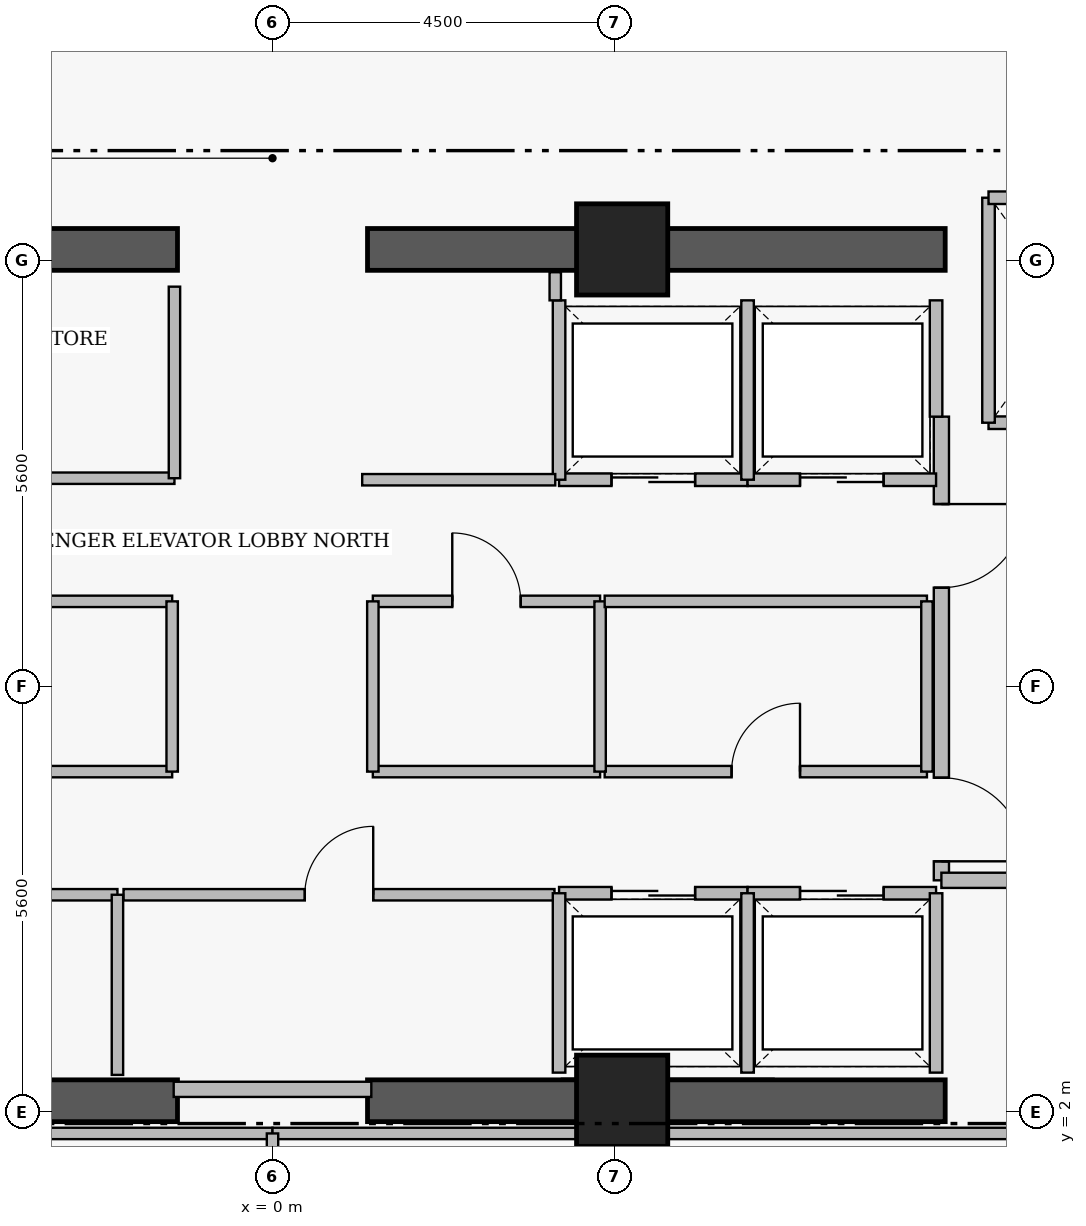
"""IFC4 building model, lengths in metres.
Left out: names, types, materials, properties, quantities, classifications, styles, units other than length and angle.
Written with IfcOpenShell. Run it as: python <this file> out.ifc"""

import sys

from ifc_helpers import new_model, si_unit, direction, frame, frame_2d, origin, origin_2d, place, context, subcontext, project, spatial, rectangle, extrude, element, fill, save


model = new_model("IFC4")
c1 = context("Model", 3, precision=1e-05, world=origin(), true_north=direction((0.0, 1.0)))
c2 = subcontext(c1, "Body", "Model", "MODEL_VIEW")
j1 = project(units=[si_unit("LENGTHUNIT", "METRE"), si_unit("PLANEANGLEUNIT", "RADIAN")], contexts=[c1])
p1 = place(None, origin())
s1 = spatial("IfcSite", under=j1, at=p1, CompositionType="ELEMENT")
p2 = place(p1, origin())
s2 = spatial("IfcBuilding", under=s1, at=p2, CompositionType="ELEMENT")
p3 = place(p2, frame((0.0, 0.0, 292.85)))
s3 = spatial("IfcBuildingStorey", under=s2, at=p3, CompositionType="ELEMENT", Elevation=292.85)
for number, where, z_axis, x_axis in (
    (1, (-8.85, 2.15, 0.0), (0.0, 0.0, 1.0), (1.0, 0.0, 0.0)),
    (2, (1.25, 2.15, 0.0), (0.0, 0.0, 1.0), (1.0, 0.0, 0.0)),
    (3, (-8.85, 13.35, 0.0), (0.0, 0.0, 1.0), (1.0, 0.0, 0.0)),
    (4, (1.25, 13.35, 0.0), (0.0, 0.0, 1.0), (1.0, 0.0, 0.0)),
):
    element("IfcWall", number, at=place(p3, frame(where, z_axis=z_axis, x_axis=x_axis)), inside=s3, PredefinedType="SHEAR", context=c2, shape_type="SweptSolid", body=[
        extrude(rectangle(XDim=7.6, YDim=0.55, at=frame_2d((3.8, 0.0))), origin(), (0.0, 0.0, 1.0), 4.16),
    ])
for number, where, z_axis, x_axis in (
    (5, (4.6, 13.35, 0.0), (0.0, 0.0, 1.0), (1.0, 0.0, 0.0)),
    (6, (4.6, 2.15, 0.0), (0.0, 0.0, 1.0), (1.0, 0.0, 0.0)),
):
    element("IfcColumn", number, at=place(p3, frame(where, z_axis=z_axis, x_axis=x_axis)), inside=s3, PredefinedType="COLUMN", context=c2, shape_type="SweptSolid", body=[
        extrude(rectangle(XDim=1.2, YDim=1.2, at=origin_2d()), origin(), (0.0, 0.0, 1.0), 4.4),
    ])
p4 = place(p3, frame((8.8, 11.15, 0.0), z_axis=(0.0, 0.0, 1.0), x_axis=(0.0, -1.0, 0.0)))
e7 = element("IfcWall", 7, at=p4, inside=s3, PredefinedType="PARTITIONING", context=c2, shape_type="SweptSolid", body=[
    extrude(rectangle(XDim=6.1, YDim=0.2, at=frame_2d((3.05, 0.0))), origin(), (0.0, 0.0, 1.0), 4.16),
])
p5 = place(p4, frame((1.15, 0.0, 0.0)))
e8 = element("IfcOpeningElement", 8, at=p5, cuts=e7, PredefinedType="OPENING", context=c2, shape_type="SweptSolid", body=[
    extrude(rectangle(XDim=1.1, YDim=2.2, at=frame_2d((0.55, 1.1))), frame((0.0, 0.11, 0.0), z_axis=(0.0, -1.0, 0.0), x_axis=(1.0, 0.0, 0.0)), (0.0, 0.0, 1.0), 0.22),
])
p6 = place(p4, frame((4.75, 0.0, 0.0)))
e9 = element("IfcOpeningElement", 9, at=p6, cuts=e7, PredefinedType="OPENING", context=c2, shape_type="SweptSolid", body=[
    extrude(rectangle(XDim=1.1, YDim=2.2, at=frame_2d((0.55, 1.1))), frame((0.0, 0.11, 0.0), z_axis=(0.0, -1.0, 0.0), x_axis=(1.0, 0.0, 0.0)), (0.0, 0.0, 1.0), 0.22),
])
p7 = place(p3, frame((9.42, 11.07, 0.0), z_axis=(0.0, 0.0, 1.0), x_axis=(1.0, 0.0, 0.0)))
e10 = element("IfcWall", 10, at=p7, inside=s3, PredefinedType="PARTITIONING", context=c2, shape_type="SweptSolid", body=[
    extrude(rectangle(XDim=2.16, YDim=0.165, at=frame_2d((1.08, 0.0))), origin(), (0.0, 0.0, 1.0), 4.16),
])
p8 = place(p7, frame((0.53, 0.0, 0.0)))
e11 = element("IfcOpeningElement", 11, at=p8, cuts=e10, PredefinedType="OPENING", context=c2, shape_type="SweptSolid", body=[
    extrude(rectangle(XDim=1.15, YDim=2.25, at=frame_2d((0.575, 1.125))), frame((0.0, 0.093, 0.0), z_axis=(0.0, -1.0, 0.0), x_axis=(1.0, 0.0, 0.0)), (0.0, 0.0, 1.0), 0.185),
])
p9 = place(p3, frame((3.77, 4.88, 0.0), z_axis=(0.0, 0.0, 1.0), x_axis=(1.0, 0.0, 0.0)))
e12 = element("IfcWall", 12, at=p9, inside=s3, PredefinedType="PARTITIONING", context=c2, shape_type="SweptSolid", body=[
    extrude(rectangle(XDim=2.48, YDim=0.165, at=frame_2d((1.24, 0.0))), origin(), (0.0, 0.0, 1.0), 4.16),
])
p10 = place(p9, frame((0.69, 0.0, 0.0)))
e13 = element("IfcOpeningElement", 13, at=p10, cuts=e12, PredefinedType="OPENING", context=c2, shape_type="SweptSolid", body=[
    extrude(rectangle(XDim=1.1, YDim=2.25, at=frame_2d((0.55, 1.125))), frame((0.0, 0.093, 0.0), z_axis=(0.0, -1.0, 0.0), x_axis=(1.0, 0.0, 0.0)), (0.0, 0.0, 1.0), 0.185),
])
p11 = place(p3, frame((6.25, 4.88, 0.0), z_axis=(0.0, 0.0, 1.0), x_axis=(1.0, 0.0, 0.0)))
e14 = element("IfcWall", 14, at=p11, inside=s3, PredefinedType="PARTITIONING", context=c2, shape_type="SweptSolid", body=[
    extrude(rectangle(XDim=2.48, YDim=0.165, at=frame_2d((1.24, 0.0))), origin(), (0.0, 0.0, 1.0), 4.16),
])
p12 = place(p11, frame((0.69, 0.0, 0.0)))
e15 = element("IfcOpeningElement", 15, at=p12, cuts=e14, PredefinedType="OPENING", context=c2, shape_type="SweptSolid", body=[
    extrude(rectangle(XDim=1.1, YDim=2.25, at=frame_2d((0.55, 1.125))), frame((0.0, 0.093, 0.0), z_axis=(0.0, -1.0, 0.0), x_axis=(1.0, 0.0, 0.0)), (0.0, 0.0, 1.0), 0.185),
])
p13 = place(p3, frame((3.77, 10.32, 0.0), z_axis=(0.0, 0.0, 1.0), x_axis=(1.0, 0.0, 0.0)))
e16 = element("IfcWall", 16, at=p13, inside=s3, PredefinedType="PARTITIONING", context=c2, shape_type="SweptSolid", body=[
    extrude(rectangle(XDim=2.48, YDim=0.165, at=frame_2d((1.24, 0.0))), origin(), (0.0, 0.0, 1.0), 4.16),
])
p14 = place(p13, frame((0.69, 0.0, 0.0)))
e17 = element("IfcOpeningElement", 17, at=p14, cuts=e16, PredefinedType="OPENING", context=c2, shape_type="SweptSolid", body=[
    extrude(rectangle(XDim=1.1, YDim=2.25, at=frame_2d((0.55, 1.125))), frame((0.0, 0.093, 0.0), z_axis=(0.0, -1.0, 0.0), x_axis=(1.0, 0.0, 0.0)), (0.0, 0.0, 1.0), 0.185),
])
p15 = place(p3, frame((6.25, 10.32, 0.0), z_axis=(0.0, 0.0, 1.0), x_axis=(1.0, 0.0, 0.0)))
e18 = element("IfcWall", 18, at=p15, inside=s3, PredefinedType="PARTITIONING", context=c2, shape_type="SweptSolid", body=[
    extrude(rectangle(XDim=2.48, YDim=0.165, at=frame_2d((1.24, 0.0))), origin(), (0.0, 0.0, 1.0), 4.16),
])
p16 = place(p15, frame((0.69, 0.0, 0.0)))
e19 = element("IfcOpeningElement", 19, at=p16, cuts=e18, PredefinedType="OPENING", context=c2, shape_type="SweptSolid", body=[
    extrude(rectangle(XDim=1.1, YDim=2.25, at=frame_2d((0.55, 1.125))), frame((0.0, 0.093, 0.0), z_axis=(0.0, -1.0, 0.0), x_axis=(1.0, 0.0, 0.0)), (0.0, 0.0, 1.0), 0.185),
])
p17 = place(p3, frame((-8.71, 4.86, 0.0), z_axis=(0.0, 0.0, 1.0), x_axis=(1.0, 0.0, 0.0)))
e20 = element("IfcWall", 20, at=p17, inside=s3, PredefinedType="PARTITIONING", context=c2, shape_type="SweptSolid", body=[
    extrude(rectangle(XDim=6.67, YDim=0.15, at=frame_2d((3.335, 0.0))), origin(), (0.0, 0.0, 1.0), 4.16),
])
p18 = place(p17, frame((2.885, 0.0, 0.0)))
e21 = element("IfcOpeningElement", 21, at=p18, cuts=e20, PredefinedType="OPENING", context=c2, shape_type="SweptSolid", body=[
    extrude(rectangle(XDim=0.9, YDim=2.15, at=frame_2d((0.45, 1.075))), frame((0.0, 0.085, 0.0), z_axis=(0.0, -1.0, 0.0), x_axis=(1.0, 0.0, 0.0)), (0.0, 0.0, 1.0), 0.17),
])
p19 = place(p3, frame((-1.96, 4.86, 0.0), z_axis=(0.0, 0.0, 1.0), x_axis=(1.0, 0.0, 0.0)))
e22 = element("IfcWall", 22, at=p19, inside=s3, PredefinedType="PARTITIONING", context=c2, shape_type="SweptSolid", body=[
    extrude(rectangle(XDim=5.67, YDim=0.15, at=frame_2d((2.835, 0.0))), origin(), (0.0, 0.0, 1.0), 4.16),
])
p20 = place(p19, frame((2.385, 0.0, 0.0)))
e23 = element("IfcOpeningElement", 23, at=p20, cuts=e22, PredefinedType="OPENING", context=c2, shape_type="SweptSolid", body=[
    extrude(rectangle(XDim=0.9, YDim=2.15, at=frame_2d((0.45, 1.075))), frame((0.0, 0.085, 0.0), z_axis=(0.0, -1.0, 0.0), x_axis=(1.0, 0.0, 0.0)), (0.0, 0.0, 1.0), 0.17),
])
p21 = place(p3, frame((-8.71, 10.34, 0.0), z_axis=(0.0, 0.0, 1.0), x_axis=(1.0, 0.0, 0.0)))
e24 = element("IfcWall", 24, at=p21, inside=s3, PredefinedType="PARTITIONING", context=c2, shape_type="SweptSolid", body=[
    extrude(rectangle(XDim=7.42, YDim=0.15, at=frame_2d((3.71, 0.0))), origin(), (0.0, 0.0, 1.0), 4.16),
])
p22 = place(p21, frame((3.26, 0.0, 0.0)))
e25 = element("IfcOpeningElement", 25, at=p22, cuts=e24, PredefinedType="OPENING", context=c2, shape_type="SweptSolid", body=[
    extrude(rectangle(XDim=0.9, YDim=2.15, at=frame_2d((0.45, 1.075))), frame((0.0, 0.085, 0.0), z_axis=(0.0, -1.0, 0.0), x_axis=(1.0, 0.0, 0.0)), (0.0, 0.0, 1.0), 0.17),
])
p23 = place(p3, frame((-8.61, 6.48, 0.0), z_axis=(0.0, 0.0, 1.0), x_axis=(1.0, 0.0, 0.0)))
e26 = element("IfcWall", 26, at=p23, inside=s3, PredefinedType="PARTITIONING", context=c2, shape_type="SweptSolid", body=[
    extrude(rectangle(XDim=7.29, YDim=0.15, at=frame_2d((3.645, 0.0))), origin(), (0.0, 0.0, 1.0), 4.16),
])
p24 = place(p23, frame((3.195, 0.0, 0.0)))
e27 = element("IfcOpeningElement", 27, at=p24, cuts=e26, PredefinedType="OPENING", context=c2, shape_type="SweptSolid", body=[
    extrude(rectangle(XDim=0.9, YDim=2.15, at=frame_2d((0.45, 1.075))), frame((0.0, 0.085, 0.0), z_axis=(0.0, -1.0, 0.0), x_axis=(1.0, 0.0, 0.0)), (0.0, 0.0, 1.0), 0.17),
])
p25 = place(p3, frame((1.32, 8.72, 0.0), z_axis=(0.0, 0.0, 1.0), x_axis=(1.0, 0.0, 0.0)))
e28 = element("IfcWall", 28, at=p25, inside=s3, PredefinedType="PARTITIONING", context=c2, shape_type="SweptSolid", body=[
    extrude(rectangle(XDim=2.99, YDim=0.15, at=frame_2d((1.495, 0.0))), origin(), (0.0, 0.0, 1.0), 4.16),
])
p26 = place(p25, frame((1.045, 0.0, 0.0)))
e29 = element("IfcOpeningElement", 29, at=p26, cuts=e28, PredefinedType="OPENING", context=c2, shape_type="SweptSolid", body=[
    extrude(rectangle(XDim=0.9, YDim=2.15, at=frame_2d((0.45, 1.075))), frame((0.0, 0.085, 0.0), z_axis=(0.0, -1.0, 0.0), x_axis=(1.0, 0.0, 0.0)), (0.0, 0.0, 1.0), 0.17),
])
p27 = place(p3, frame((4.37, 6.48, 0.0), z_axis=(0.0, 0.0, 1.0), x_axis=(1.0, 0.0, 0.0)))
e30 = element("IfcWall", 30, at=p27, inside=s3, PredefinedType="PARTITIONING", context=c2, shape_type="SweptSolid", body=[
    extrude(rectangle(XDim=4.24, YDim=0.15, at=frame_2d((2.12, 0.0))), origin(), (0.0, 0.0, 1.0), 4.16),
])
p28 = place(p27, frame((1.67, 0.0, 0.0)))
e31 = element("IfcOpeningElement", 31, at=p28, cuts=e30, PredefinedType="OPENING", context=c2, shape_type="SweptSolid", body=[
    extrude(rectangle(XDim=0.9, YDim=2.15, at=frame_2d((0.45, 1.075))), frame((0.0, 0.085, 0.0), z_axis=(0.0, -1.0, 0.0), x_axis=(1.0, 0.0, 0.0)), (0.0, 0.0, 1.0), 0.17),
])
p29 = place(p3, frame((8.8, 5.05, 0.0), z_axis=(0.0, 0.0, 1.0), x_axis=(1.0, 0.0, 0.0)))
e32 = element("IfcWall", 32, at=p29, inside=s3, PredefinedType="PARTITIONING", context=c2, shape_type="SweptSolid", body=[
    extrude(rectangle(XDim=2.85, YDim=0.2, at=frame_2d((1.425, 0.0))), origin(), (0.0, 0.0, 1.0), 4.16),
])
p30 = place(p3, frame((9.42, 11.07, 0.0), z_axis=(0.0, 0.0, 1.0), x_axis=(0.0, 1.0, 0.0)))
e33 = element("IfcWall", 33, at=p30, inside=s3, PredefinedType="PARTITIONING", context=c2, shape_type="SweptSolid", body=[
    extrude(rectangle(XDim=2.96, YDim=0.165, at=frame_2d((1.48, 0.0))), origin(), (0.0, 0.0, 1.0), 4.16),
])
p31 = place(p3, frame((9.42, 14.03, 0.0), z_axis=(0.0, 0.0, 1.0), x_axis=(1.0, 0.0, 0.0)))
e34 = element("IfcWall", 34, at=p31, inside=s3, PredefinedType="PARTITIONING", context=c2, shape_type="SweptSolid", body=[
    extrude(rectangle(XDim=2.16, YDim=0.165, at=frame_2d((1.08, 0.0))), origin(), (0.0, 0.0, 1.0), 4.16),
])
for number, where, z_axis, x_axis in (
    (35, (3.77, 2.52, 0.0), (0.0, 0.0, 1.0), (0.0, 1.0, 0.0)),
    (36, (6.25, 2.52, 0.0), (0.0, 0.0, 1.0), (0.0, 1.0, 0.0)),
    (37, (8.73, 2.52, 0.0), (0.0, 0.0, 1.0), (0.0, 1.0, 0.0)),
    (38, (3.77, 10.32, 0.0), (0.0, 0.0, 1.0), (0.0, 1.0, 0.0)),
    (39, (6.25, 10.32, 0.0), (0.0, 0.0, 1.0), (0.0, 1.0, 0.0)),
):
    element("IfcWall", number, at=place(p3, frame(where, z_axis=z_axis, x_axis=x_axis)), inside=s3, PredefinedType="PARTITIONING", context=c2, shape_type="SweptSolid", body=[
        extrude(rectangle(XDim=2.36, YDim=0.165, at=frame_2d((1.18, 0.0))), origin(), (0.0, 0.0, 1.0), 4.16),
    ])
p32 = place(p3, frame((8.73, 11.15, 0.0), z_axis=(0.0, 0.0, 1.0), x_axis=(0.0, 1.0, 0.0)))
e40 = element("IfcWall", 40, at=p32, inside=s3, PredefinedType="PARTITIONING", context=c2, shape_type="SweptSolid", body=[
    extrude(rectangle(XDim=1.53, YDim=0.165, at=frame_2d((0.765, 0.0))), origin(), (0.0, 0.0, 1.0), 4.16),
])
p33 = place(p3, frame((-1.3, 2.3, 0.0), z_axis=(0.0, 0.0, 1.0), x_axis=(1.0, 0.0, 0.0)))
e41 = element("IfcWall", 41, at=p33, inside=s3, PredefinedType="PARTITIONING", context=c2, shape_type="SweptSolid", body=[
    extrude(rectangle(XDim=2.6, YDim=0.2, at=frame_2d((1.3, 0.0))), origin(), (0.0, 0.0, 1.0), 3.06),
])
p34 = place(p3, frame((-2.04, 2.49, 0.0), z_axis=(0.0, 0.0, 1.0), x_axis=(0.0, 1.0, 0.0)))
e42 = element("IfcWall", 42, at=p34, inside=s3, PredefinedType="PARTITIONING", context=c2, shape_type="SweptSolid", body=[
    extrude(rectangle(XDim=2.37, YDim=0.15, at=frame_2d((1.185, 0.0))), origin(), (0.0, 0.0, 1.0), 4.16),
])
p35 = place(p3, frame((-1.29, 10.34, 0.0), z_axis=(0.0, 0.0, 1.0), x_axis=(0.0, 1.0, 0.0)))
e43 = element("IfcWall", 43, at=p35, inside=s3, PredefinedType="PARTITIONING", context=c2, shape_type="SweptSolid", body=[
    extrude(rectangle(XDim=2.52, YDim=0.15, at=frame_2d((1.26, 0.0))), origin(), (0.0, 0.0, 1.0), 4.16),
])
p36 = place(p3, frame((-8.61, 8.72, 0.0), z_axis=(0.0, 0.0, 1.0), x_axis=(1.0, 0.0, 0.0)))
e44 = element("IfcWall", 44, at=p36, inside=s3, PredefinedType="PARTITIONING", context=c2, shape_type="SweptSolid", body=[
    extrude(rectangle(XDim=7.29, YDim=0.15, at=frame_2d((3.645, 0.0))), origin(), (0.0, 0.0, 1.0), 4.16),
])
p37 = place(p3, frame((-1.32, 6.48, 0.0), z_axis=(0.0, 0.0, 1.0), x_axis=(0.0, 1.0, 0.0)))
e45 = element("IfcWall", 45, at=p37, inside=s3, PredefinedType="PARTITIONING", context=c2, shape_type="SweptSolid", body=[
    extrude(rectangle(XDim=2.24, YDim=0.15, at=frame_2d((1.12, 0.0))), origin(), (0.0, 0.0, 1.0), 4.16),
])
p38 = place(p3, frame((1.32, 6.48, 0.0), z_axis=(0.0, 0.0, 1.0), x_axis=(1.0, 0.0, 0.0)))
e46 = element("IfcWall", 46, at=p38, inside=s3, PredefinedType="PARTITIONING", context=c2, shape_type="SweptSolid", body=[
    extrude(rectangle(XDim=2.99, YDim=0.15, at=frame_2d((1.495, 0.0))), origin(), (0.0, 0.0, 1.0), 4.16),
])
for number, where, z_axis, x_axis in (
    (47, (1.32, 6.48, 0.0), (0.0, 0.0, 1.0), (0.0, 1.0, 0.0)),
    (48, (4.31, 6.48, 0.0), (0.0, 0.0, 1.0), (0.0, 1.0, 0.0)),
):
    element("IfcWall", number, at=place(p3, frame(where, z_axis=z_axis, x_axis=x_axis)), inside=s3, PredefinedType="PARTITIONING", context=c2, shape_type="SweptSolid", body=[
        extrude(rectangle(XDim=2.24, YDim=0.15, at=frame_2d((1.12, 0.0))), origin(), (0.0, 0.0, 1.0), 4.16),
    ])
p39 = place(p3, frame((4.37, 8.72, 0.0), z_axis=(0.0, 0.0, 1.0), x_axis=(1.0, 0.0, 0.0)))
e49 = element("IfcWall", 49, at=p39, inside=s3, PredefinedType="PARTITIONING", context=c2, shape_type="SweptSolid", body=[
    extrude(rectangle(XDim=4.24, YDim=0.15, at=frame_2d((2.12, 0.0))), origin(), (0.0, 0.0, 1.0), 4.16),
])
p40 = place(p3, frame((8.61, 6.48, 0.0), z_axis=(0.0, 0.0, 1.0), x_axis=(0.0, 1.0, 0.0)))
e50 = element("IfcWall", 50, at=p40, inside=s3, PredefinedType="PARTITIONING", context=c2, shape_type="SweptSolid", body=[
    extrude(rectangle(XDim=2.24, YDim=0.15, at=frame_2d((1.12, 0.0))), origin(), (0.0, 0.0, 1.0), 4.16),
])
p41 = place(p3, frame((1.18, 10.32, 0.0), z_axis=(0.0, 0.0, 1.0), x_axis=(1.0, 0.0, 0.0)))
e51 = element("IfcWall", 51, at=p41, inside=s3, PredefinedType="PARTITIONING", context=c2, shape_type="SweptSolid", body=[
    extrude(rectangle(XDim=2.54, YDim=0.15, at=frame_2d((1.27, 0.0))), origin(), (0.0, 0.0, 1.0), 4.16),
])
p42 = place(p3, frame((3.72, 12.68, 0.0), z_axis=(0.0, 0.0, 1.0), x_axis=(0.0, 1.0, 0.0)))
e52 = element("IfcWall", 52, at=p42, inside=s3, PredefinedType="PARTITIONING", context=c2, shape_type="SweptSolid", body=[
    extrude(rectangle(XDim=0.37, YDim=0.15, at=frame_2d((0.185, 0.0))), origin(), (0.0, 0.0, 1.0), 4.16),
])
for number, where, z_axis, x_axis in (
    (53, (-11.68, 1.72, 0.0), (0.0, 0.0, 1.0), (1.0, 0.0, 0.0)),
    (54, (0.0, 1.72, 0.0), (0.0, 0.0, 1.0), (1.0, 0.0, 0.0)),
):
    element("IfcWall", number, at=place(p3, frame(where, z_axis=z_axis, x_axis=x_axis)), inside=s3, PredefinedType="PARTITIONING", context=c2, shape_type="SweptSolid", body=[
        extrude(rectangle(XDim=11.68, YDim=0.15, at=frame_2d((5.84, 0.0))), origin(), (0.0, 0.0, 1.0), 3.06),
    ])
p43 = place(p3, frame((0.0, 0.06, 0.0), z_axis=(0.0, 0.0, 1.0), x_axis=(0.0, 1.0, 0.0)))
e55 = element("IfcWall", 55, at=p43, inside=s3, PredefinedType="PARTITIONING", context=c2, shape_type="SweptSolid", body=[
    extrude(rectangle(XDim=1.66, YDim=0.15, at=frame_2d((0.83, 0.0))), origin(), (0.0, 0.0, 1.0), 4.16),
])
p44 = place(p5, origin())
e56 = element("IfcDoor", 56, at=p44, inside=s3, OperationType="SINGLE_SWING_LEFT", PredefinedType="DOOR", context=c2, shape_type="SweptSolid", body=[
    extrude(rectangle(XDim=1.1, YDim=2.2, at=frame_2d((0.55, 1.1))), frame((0.0, 0.025, 0.0), z_axis=(0.0, -1.0, 0.0), x_axis=(1.0, 0.0, 0.0)), (0.0, 0.0, 1.0), 0.05),
])
fill(e8, e56)
p45 = place(p6, origin())
e57 = element("IfcDoor", 57, at=p45, inside=s3, OperationType="SINGLE_SWING_RIGHT", PredefinedType="DOOR", context=c2, shape_type="SweptSolid", body=[
    extrude(rectangle(XDim=1.1, YDim=2.2, at=frame_2d((0.55, 1.1))), frame((0.0, 0.025, 0.0), z_axis=(0.0, -1.0, 0.0), x_axis=(1.0, 0.0, 0.0)), (0.0, 0.0, 1.0), 0.05),
])
fill(e9, e57)
p46 = place(p10, origin())
e58 = element("IfcDoor", 58, at=p46, inside=s3, OperationType="SLIDING_TO_LEFT", PredefinedType="DOOR", context=c2, shape_type="SweptSolid", body=[
    extrude(rectangle(XDim=1.1, YDim=2.25, at=frame_2d((0.55, 1.125))), frame((0.0, 0.025, 0.0), z_axis=(0.0, -1.0, 0.0), x_axis=(1.0, 0.0, 0.0)), (0.0, 0.0, 1.0), 0.05),
])
fill(e13, e58)
p47 = place(p12, origin())
e59 = element("IfcDoor", 59, at=p47, inside=s3, OperationType="SLIDING_TO_LEFT", PredefinedType="DOOR", context=c2, shape_type="SweptSolid", body=[
    extrude(rectangle(XDim=1.1, YDim=2.25, at=frame_2d((0.55, 1.125))), frame((0.0, 0.025, 0.0), z_axis=(0.0, -1.0, 0.0), x_axis=(1.0, 0.0, 0.0)), (0.0, 0.0, 1.0), 0.05),
])
fill(e15, e59)
p48 = place(p14, origin())
e60 = element("IfcDoor", 60, at=p48, inside=s3, OperationType="SLIDING_TO_LEFT", PredefinedType="DOOR", context=c2, shape_type="SweptSolid", body=[
    extrude(rectangle(XDim=1.1, YDim=2.25, at=frame_2d((0.55, 1.125))), frame((0.0, 0.025, 0.0), z_axis=(0.0, -1.0, 0.0), x_axis=(1.0, 0.0, 0.0)), (0.0, 0.0, 1.0), 0.05),
])
fill(e17, e60)
p49 = place(p16, origin())
e61 = element("IfcDoor", 61, at=p49, inside=s3, OperationType="SLIDING_TO_LEFT", PredefinedType="DOOR", context=c2, shape_type="SweptSolid", body=[
    extrude(rectangle(XDim=1.1, YDim=2.25, at=frame_2d((0.55, 1.125))), frame((0.0, 0.025, 0.0), z_axis=(0.0, -1.0, 0.0), x_axis=(1.0, 0.0, 0.0)), (0.0, 0.0, 1.0), 0.05),
])
fill(e19, e61)
p50 = place(p20, origin())
e62 = element("IfcDoor", 62, at=p50, inside=s3, OperationType="SINGLE_SWING_RIGHT", PredefinedType="DOOR", context=c2, shape_type="SweptSolid", body=[
    extrude(rectangle(XDim=0.9, YDim=2.15, at=frame_2d((0.45, 1.075))), frame((0.0, 0.025, 0.0), z_axis=(0.0, -1.0, 0.0), x_axis=(1.0, 0.0, 0.0)), (0.0, 0.0, 1.0), 0.05),
])
fill(e23, e62)
p51 = place(p26, origin())
e63 = element("IfcDoor", 63, at=p51, inside=s3, OperationType="SINGLE_SWING_LEFT", PredefinedType="DOOR", context=c2, shape_type="SweptSolid", body=[
    extrude(rectangle(XDim=0.9, YDim=2.15, at=frame_2d((0.45, 1.075))), frame((0.0, 0.025, 0.0), z_axis=(0.0, -1.0, 0.0), x_axis=(1.0, 0.0, 0.0)), (0.0, 0.0, 1.0), 0.05),
])
fill(e29, e63)
p52 = place(p28, origin())
e64 = element("IfcDoor", 64, at=p52, inside=s3, OperationType="SINGLE_SWING_RIGHT", PredefinedType="DOOR", context=c2, shape_type="SweptSolid", body=[
    extrude(rectangle(XDim=0.9, YDim=2.15, at=frame_2d((0.45, 1.075))), frame((0.0, 0.025, 0.0), z_axis=(0.0, -1.0, 0.0), x_axis=(1.0, 0.0, 0.0)), (0.0, 0.0, 1.0), 0.05),
])
fill(e31, e64)
save(model, sys.argv[1])
